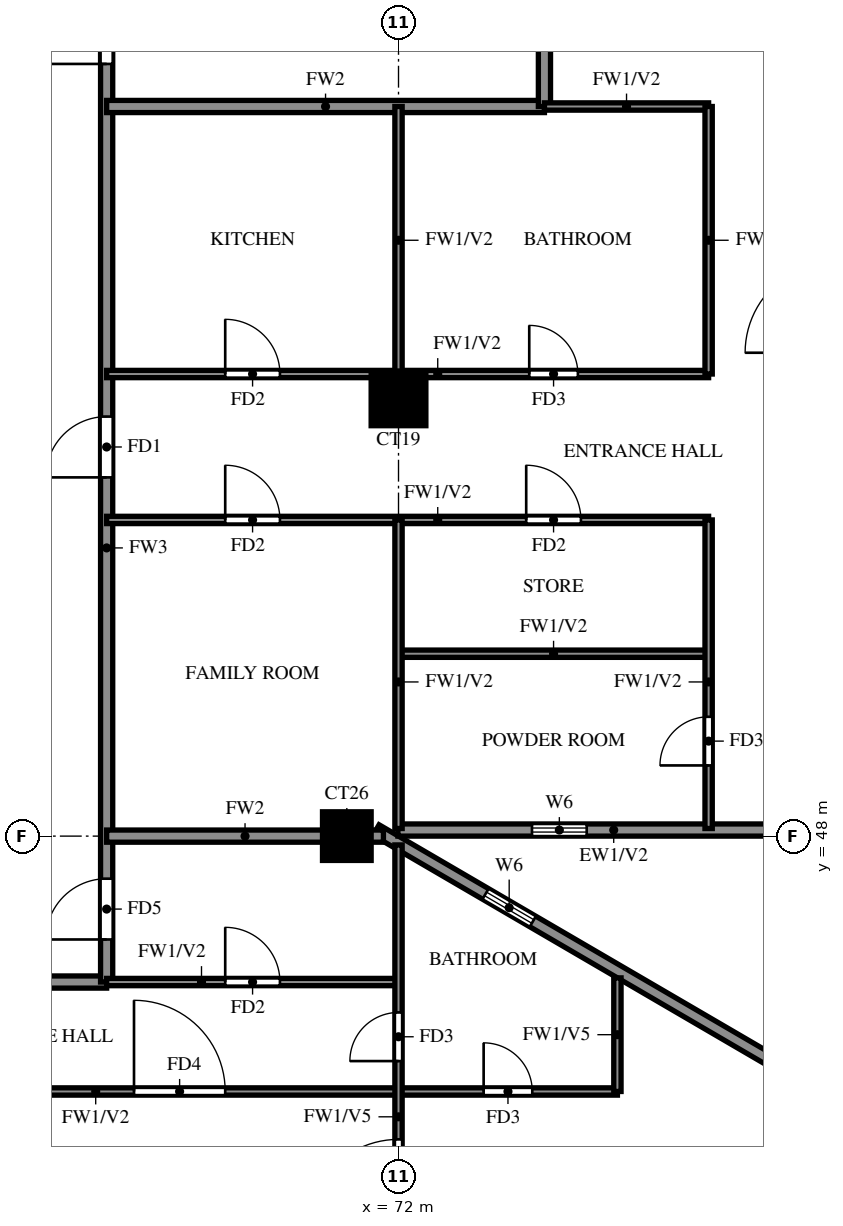
"""IFC4 building model, lengths in metres.
Left out: names, types, materials, properties, quantities, classifications, styles, units other than length and angle.
Written with IfcOpenShell. Run it as: python <this file> out.ifc"""

import sys

from ifc_helpers import new_model, si_unit, direction, frame, frame_2d, origin, origin_2d, place, context, subcontext, project, spatial, rectangle, extrude, source, transform, mapped, element, fill, save


model = new_model("IFC4")
c1 = context("Model", 3, precision=1e-05, world=origin(), true_north=direction((0.0, 1.0)))
c2 = subcontext(c1, "Body", "Model", "MODEL_VIEW")
j1 = project(units=[si_unit("LENGTHUNIT", "METRE"), si_unit("PLANEANGLEUNIT", "RADIAN")], contexts=[c1])
p1 = place(None, origin())
s1 = spatial("IfcSite", under=j1, at=p1, CompositionType="ELEMENT")
p2 = place(p1, origin())
s2 = spatial("IfcBuilding", under=s1, at=p2, CompositionType="ELEMENT")
p3 = place(p2, frame((0.0, 0.0, 188.5)))
s3 = spatial("IfcBuildingStorey", under=s2, at=p3, CompositionType="ELEMENT", Elevation=188.5)
m1 = source(origin(), c2, "Body", "SweptSolid", [
    extrude(rectangle(XDim=0.8, YDim=0.8, at=origin_2d()), origin(), (0.0, 0.0, 1.0), 3.2),
])
p4 = place(p3, frame((71.15, 48.0, 0.0), z_axis=(0.0, 0.0, 1.0), x_axis=(1.0, 0.0, 0.0)))
e1 = element("IfcColumn", 1, at=p4, inside=s3, PredefinedType="COLUMN", context=c2, shape_type="MappedRepresentation", body=[
    mapped(m1, transform((0.0, 0.0, 0.0))),
])
m2 = source(origin(), c2, "Body", "SweptSolid", [
    extrude(rectangle(XDim=0.9, YDim=0.9, at=origin_2d()), origin(), (0.0, 0.0, 1.0), 3.2),
])
p5 = place(p3, frame((72.0, 55.2, 0.0), z_axis=(0.0, 0.0, 1.0), x_axis=(1.0, 0.0, 0.0)))
e2 = element("IfcColumn", 2, at=p5, inside=s3, PredefinedType="COLUMN", context=c2, shape_type="MappedRepresentation", body=[
    mapped(m2, transform((0.0, 0.0, 0.0))),
])
p6 = place(p3, frame((85.719, 39.881, 0.0), z_axis=(0.0, 0.0, 1.0), x_axis=(-0.86377618652, 0.503875678716, 0.0)))
e3 = element("IfcWall", 3, at=p6, inside=s3, PredefinedType="SOLIDWALL", context=c2, shape_type="SweptSolid", body=[
    extrude(rectangle(XDim=16.311, YDim=0.2, at=frame_2d((8.156, 0.0))), origin(), (0.0, 0.0, 1.0), 3.2),
])
p7 = place(p6, frame((13.326, 0.0, 1.5)))
e4 = element("IfcOpeningElement", 4, at=p7, cuts=e3, PredefinedType="OPENING", context=c2, shape_type="SweptSolid", body=[
    extrude(rectangle(XDim=0.9, YDim=0.9, at=frame_2d((0.45, 0.45))), frame((0.0, 0.11, 0.0), z_axis=(0.0, -1.0, 0.0), x_axis=(1.0, 0.0, 0.0)), (0.0, 0.0, 1.0), 0.22),
])
p8 = place(p3, frame((71.99, 48.1, 0.0), z_axis=(0.0, 0.0, 1.0), x_axis=(1.0, 0.0, 0.0)))
e5 = element("IfcWall", 5, at=p8, inside=s3, PredefinedType="SOLIDWALL", context=c2, shape_type="SweptSolid", body=[
    extrude(rectangle(XDim=6.76, YDim=0.2, at=frame_2d((3.38, 0.0))), origin(), (0.0, 0.0, 1.0), 3.2),
])
p9 = place(p8, frame((2.205, 0.0, 1.5)))
e6 = element("IfcOpeningElement", 6, at=p9, cuts=e5, PredefinedType="OPENING", context=c2, shape_type="SweptSolid", body=[
    extrude(rectangle(XDim=0.9, YDim=0.9, at=frame_2d((0.45, 0.45))), frame((0.0, 0.11, 0.0), z_axis=(0.0, -1.0, 0.0), x_axis=(1.0, 0.0, 0.0)), (0.0, 0.0, 1.0), 0.22),
])
p10 = place(p3, frame((60.0, 45.6, 0.0), z_axis=(0.0, 0.0, 1.0), x_axis=(1.0, 0.0, 0.0)))
e7 = element("IfcWall", 7, at=p10, inside=s3, PredefinedType="SOLIDWALL", context=c2, shape_type="SweptSolid", body=[
    extrude(rectangle(XDim=7.2, YDim=0.2, at=frame_2d((3.6, 0.0))), origin(), (0.0, 0.0, 1.0), 3.2),
])
p11 = place(p3, frame((67.2, 45.6, 0.0), z_axis=(0.0, 0.0, 1.0), x_axis=(0.0, 1.0, 0.0)))
e8 = element("IfcWall", 8, at=p11, inside=s3, PredefinedType="SOLIDWALL", context=c2, shape_type="SweptSolid", body=[
    extrude(rectangle(XDim=16.8, YDim=0.2, at=frame_2d((8.4, 0.0))), origin(), (0.0, 0.0, 1.0), 3.2),
])
p12 = place(p11, frame((8.3, 0.0, 0.0)))
e9 = element("IfcOpeningElement", 9, at=p12, cuts=e8, PredefinedType="OPENING", context=c2, shape_type="SweptSolid", body=[
    extrude(rectangle(XDim=1.0, YDim=2.1, at=frame_2d((0.5, 1.05))), frame((0.0, 0.11, 0.0), z_axis=(0.0, -1.0, 0.0), x_axis=(1.0, 0.0, 0.0)), (0.0, 0.0, 1.0), 0.22),
])
p13 = place(p11, frame((15.1, 0.0, 0.0)))
e10 = element("IfcOpeningElement", 10, at=p13, cuts=e8, PredefinedType="OPENING", context=c2, shape_type="SweptSolid", body=[
    extrude(rectangle(XDim=1.0, YDim=2.1, at=frame_2d((0.5, 1.05))), frame((0.0, 0.11, 0.0), z_axis=(0.0, -1.0, 0.0), x_axis=(1.0, 0.0, 0.0)), (0.0, 0.0, 1.0), 0.22),
])
p14 = place(p11, frame((0.7, 0.0, 0.0)))
e11 = element("IfcOpeningElement", 11, at=p14, cuts=e8, PredefinedType="OPENING", context=c2, shape_type="SweptSolid", body=[
    extrude(rectangle(XDim=1.0, YDim=2.1, at=frame_2d((0.5, 1.05))), frame((0.0, 0.11, 0.0), z_axis=(0.0, -1.0, 0.0), x_axis=(1.0, 0.0, 0.0)), (0.0, 0.0, 1.0), 0.22),
])
p15 = place(p3, frame((67.2, 48.0, 0.0), z_axis=(0.0, 0.0, 1.0), x_axis=(1.0, 0.0, 0.0)))
e12 = element("IfcWall", 12, at=p15, inside=s3, PredefinedType="SOLIDWALL", context=c2, shape_type="SweptSolid", body=[
    extrude(rectangle(XDim=4.552, YDim=0.2, at=frame_2d((2.276, 0.0))), origin(), (0.0, 0.0, 1.0), 3.2),
])
p16 = place(p3, frame((67.2, 60.0, 0.0), z_axis=(0.0, 0.0, 1.0), x_axis=(1.0, 0.0, 0.0)))
e13 = element("IfcWall", 13, at=p16, inside=s3, PredefinedType="SOLIDWALL", context=c2, shape_type="SweptSolid", body=[
    extrude(rectangle(XDim=7.2, YDim=0.2, at=frame_2d((3.6, 0.0))), origin(), (0.0, 0.0, 1.0), 3.2),
])
p17 = place(p3, frame((74.4, 60.0, 0.0), z_axis=(0.0, 0.0, 1.0), x_axis=(0.0, 1.0, 0.0)))
e14 = element("IfcWall", 14, at=p17, inside=s3, PredefinedType="SOLIDWALL", context=c2, shape_type="SweptSolid", body=[
    extrude(rectangle(XDim=2.4, YDim=0.2, at=frame_2d((1.2, 0.0))), origin(), (0.0, 0.0, 1.0), 3.2),
])
p18 = place(p3, frame((60.0, 43.8, 0.0), z_axis=(0.0, 0.0, 1.0), x_axis=(1.0, 0.0, 0.0)))
e15 = element("IfcWall", 15, at=p18, inside=s3, PredefinedType="PARTITIONING", context=c2, shape_type="SweptSolid", body=[
    extrude(rectangle(XDim=15.6, YDim=0.12, at=frame_2d((7.8, 0.0))), origin(), (0.0, 0.0, 1.0), 3.2),
])
p19 = place(p18, frame((7.65, 0.0, 0.0)))
e16 = element("IfcOpeningElement", 16, at=p19, cuts=e15, PredefinedType="OPENING", context=c2, shape_type="SweptSolid", body=[
    extrude(rectangle(XDim=1.5, YDim=2.1, at=frame_2d((0.75, 1.05))), frame((0.0, 0.07, 0.0), z_axis=(0.0, -1.0, 0.0), x_axis=(1.0, 0.0, 0.0)), (0.0, 0.0, 1.0), 0.14),
])
p20 = place(p18, frame((1.95, 0.0, 0.0)))
e17 = element("IfcOpeningElement", 17, at=p20, cuts=e15, PredefinedType="OPENING", context=c2, shape_type="SweptSolid", body=[
    extrude(rectangle(XDim=0.9, YDim=2.1, at=frame_2d((0.45, 1.05))), frame((0.0, 0.07, 0.0), z_axis=(0.0, -1.0, 0.0), x_axis=(1.0, 0.0, 0.0)), (0.0, 0.0, 1.0), 0.14),
])
p21 = place(p18, frame((13.4, 0.0, 0.0)))
e18 = element("IfcOpeningElement", 18, at=p21, cuts=e15, PredefinedType="OPENING", context=c2, shape_type="SweptSolid", body=[
    extrude(rectangle(XDim=0.8, YDim=2.1, at=frame_2d((0.4, 1.05))), frame((0.0, 0.07, 0.0), z_axis=(0.0, -1.0, 0.0), x_axis=(1.0, 0.0, 0.0)), (0.0, 0.0, 1.0), 0.14),
])
p22 = place(p3, frame((67.2, 45.6, 0.0), z_axis=(0.0, 0.0, 1.0), x_axis=(1.0, 0.0, 0.0)))
e19 = element("IfcWall", 19, at=p22, inside=s3, PredefinedType="PARTITIONING", context=c2, shape_type="SweptSolid", body=[
    extrude(rectangle(XDim=4.8, YDim=0.12, at=frame_2d((2.4, 0.0))), origin(), (0.0, 0.0, 1.0), 3.2),
])
p23 = place(p22, frame((1.95, 0.0, 0.0)))
e20 = element("IfcOpeningElement", 20, at=p23, cuts=e19, PredefinedType="OPENING", context=c2, shape_type="SweptSolid", body=[
    extrude(rectangle(XDim=0.9, YDim=2.1, at=frame_2d((0.45, 1.05))), frame((0.0, 0.07, 0.0), z_axis=(0.0, -1.0, 0.0), x_axis=(1.0, 0.0, 0.0)), (0.0, 0.0, 1.0), 0.14),
])
p24 = place(p3, frame((72.0, 51.0, 0.0), z_axis=(0.0, 0.0, 1.0), x_axis=(1.0, 0.0, 0.0)))
e21 = element("IfcWall", 21, at=p24, inside=s3, PredefinedType="PARTITIONING", context=c2, shape_type="SweptSolid", body=[
    extrude(rectangle(XDim=5.1, YDim=0.12, at=frame_2d((2.55, 0.0))), origin(), (0.0, 0.0, 1.0), 3.2),
])
p25 = place(p3, frame((67.2, 53.2, 0.0), z_axis=(0.0, 0.0, 1.0), x_axis=(1.0, 0.0, 0.0)))
e22 = element("IfcWall", 22, at=p25, inside=s3, PredefinedType="PARTITIONING", context=c2, shape_type="SweptSolid", body=[
    extrude(rectangle(XDim=9.9, YDim=0.12, at=frame_2d((4.95, 0.0))), origin(), (0.0, 0.0, 1.0), 3.2),
])
p26 = place(p25, frame((6.9, 0.0, 0.0)))
e23 = element("IfcOpeningElement", 23, at=p26, cuts=e22, PredefinedType="OPENING", context=c2, shape_type="SweptSolid", body=[
    extrude(rectangle(XDim=0.9, YDim=2.1, at=frame_2d((0.45, 1.05))), frame((0.0, 0.07, 0.0), z_axis=(0.0, -1.0, 0.0), x_axis=(1.0, 0.0, 0.0)), (0.0, 0.0, 1.0), 0.14),
])
p27 = place(p25, frame((1.95, 0.0, 0.0)))
e24 = element("IfcOpeningElement", 24, at=p27, cuts=e22, PredefinedType="OPENING", context=c2, shape_type="SweptSolid", body=[
    extrude(rectangle(XDim=0.9, YDim=2.1, at=frame_2d((0.45, 1.05))), frame((0.0, 0.07, 0.0), z_axis=(0.0, -1.0, 0.0), x_axis=(1.0, 0.0, 0.0)), (0.0, 0.0, 1.0), 0.14),
])
p28 = place(p3, frame((67.2, 55.6, 0.0), z_axis=(0.0, 0.0, 1.0), x_axis=(1.0, 0.0, 0.0)))
e25 = element("IfcWall", 25, at=p28, inside=s3, PredefinedType="PARTITIONING", context=c2, shape_type="SweptSolid", body=[
    extrude(rectangle(XDim=9.9, YDim=0.12, at=frame_2d((4.95, 0.0))), origin(), (0.0, 0.0, 1.0), 3.2),
])
p29 = place(p28, frame((6.95, 0.0, 0.0)))
e26 = element("IfcOpeningElement", 26, at=p29, cuts=e25, PredefinedType="OPENING", context=c2, shape_type="SweptSolid", body=[
    extrude(rectangle(XDim=0.8, YDim=2.1, at=frame_2d((0.4, 1.05))), frame((0.0, 0.07, 0.0), z_axis=(0.0, -1.0, 0.0), x_axis=(1.0, 0.0, 0.0)), (0.0, 0.0, 1.0), 0.14),
])
p30 = place(p28, frame((1.95, 0.0, 0.0)))
e27 = element("IfcOpeningElement", 27, at=p30, cuts=e25, PredefinedType="OPENING", context=c2, shape_type="SweptSolid", body=[
    extrude(rectangle(XDim=0.9, YDim=2.1, at=frame_2d((0.45, 1.05))), frame((0.0, 0.07, 0.0), z_axis=(0.0, -1.0, 0.0), x_axis=(1.0, 0.0, 0.0)), (0.0, 0.0, 1.0), 0.14),
])
p31 = place(p3, frame((74.4, 60.0, 0.0), z_axis=(0.0, 0.0, 1.0), x_axis=(1.0, 0.0, 0.0)))
e28 = element("IfcWall", 28, at=p31, inside=s3, PredefinedType="PARTITIONING", context=c2, shape_type="SweptSolid", body=[
    extrude(rectangle(XDim=2.7, YDim=0.12, at=frame_2d((1.35, 0.0))), origin(), (0.0, 0.0, 1.0), 3.2),
])
p32 = place(p3, frame((72.0, 39.725, 0.0), z_axis=(0.0, 0.0, 1.0), x_axis=(0.0, 1.0, 0.0)))
e29 = element("IfcWall", 29, at=p32, inside=s3, PredefinedType="PARTITIONING", context=c2, shape_type="SweptSolid", body=[
    extrude(rectangle(XDim=8.13, YDim=0.12, at=frame_2d((4.065, 0.0))), origin(), (0.0, 0.0, 1.0), 2.3),
])
p33 = place(p32, frame((1.788, 0.0, 0.0)))
e30 = element("IfcOpeningElement", 30, at=p33, cuts=e29, PredefinedType="OPENING", context=c2, shape_type="SweptSolid", body=[
    extrude(rectangle(XDim=1.5, YDim=2.1, at=frame_2d((0.75, 1.05))), frame((0.0, 0.07, 0.0), z_axis=(0.0, -1.0, 0.0), x_axis=(1.0, 0.0, 0.0)), (0.0, 0.0, 1.0), 0.14),
])
p34 = place(p32, frame((4.575, 0.0, 0.0)))
e31 = element("IfcOpeningElement", 31, at=p34, cuts=e29, PredefinedType="OPENING", context=c2, shape_type="SweptSolid", body=[
    extrude(rectangle(XDim=0.8, YDim=2.1, at=frame_2d((0.4, 1.05))), frame((0.0, 0.07, 0.0), z_axis=(0.0, -1.0, 0.0), x_axis=(1.0, 0.0, 0.0)), (0.0, 0.0, 1.0), 0.14),
])
p35 = place(p3, frame((72.0, 48.125, 0.0), z_axis=(0.0, 0.0, 1.0), x_axis=(0.0, 1.0, 0.0)))
e32 = element("IfcWall", 32, at=p35, inside=s3, PredefinedType="PARTITIONING", context=c2, shape_type="SweptSolid", body=[
    extrude(rectangle(XDim=5.075, YDim=0.12, at=frame_2d((2.538, 0.0))), origin(), (0.0, 0.0, 1.0), 3.2),
])
p36 = place(p3, frame((72.0, 55.6, 0.0), z_axis=(0.0, 0.0, 1.0), x_axis=(0.0, 1.0, 0.0)))
e33 = element("IfcWall", 33, at=p36, inside=s3, PredefinedType="PARTITIONING", context=c2, shape_type="SweptSolid", body=[
    extrude(rectangle(XDim=4.4, YDim=0.12, at=frame_2d((2.2, 0.0))), origin(), (0.0, 0.0, 1.0), 3.2),
])
p37 = place(p3, frame((75.6, 43.8, 0.0), z_axis=(0.0, 0.0, 1.0), x_axis=(0.0, 1.0, 0.0)))
e34 = element("IfcWall", 34, at=p37, inside=s3, PredefinedType="PARTITIONING", context=c2, shape_type="SweptSolid", body=[
    extrude(rectangle(XDim=1.868, YDim=0.12, at=frame_2d((0.934, 0.0))), origin(), (0.0, 0.0, 1.0), 2.3),
])
p38 = place(p3, frame((77.1, 48.125, 0.0), z_axis=(0.0, 0.0, 1.0), x_axis=(0.0, 1.0, 0.0)))
e35 = element("IfcWall", 35, at=p38, inside=s3, PredefinedType="PARTITIONING", context=c2, shape_type="SweptSolid", body=[
    extrude(rectangle(XDim=5.075, YDim=0.12, at=frame_2d((2.538, 0.0))), origin(), (0.0, 0.0, 1.0), 3.2),
])
p39 = place(p38, frame((1.038, 0.0, 0.0)))
e36 = element("IfcOpeningElement", 36, at=p39, cuts=e35, PredefinedType="OPENING", context=c2, shape_type="SweptSolid", body=[
    extrude(rectangle(XDim=0.8, YDim=2.1, at=frame_2d((0.4, 1.05))), frame((0.0, 0.07, 0.0), z_axis=(0.0, -1.0, 0.0), x_axis=(1.0, 0.0, 0.0)), (0.0, 0.0, 1.0), 0.14),
])
p40 = place(p3, frame((77.1, 55.6, 0.0), z_axis=(0.0, 0.0, 1.0), x_axis=(0.0, 1.0, 0.0)))
e37 = element("IfcWall", 37, at=p40, inside=s3, PredefinedType="PARTITIONING", context=c2, shape_type="SweptSolid", body=[
    extrude(rectangle(XDim=4.4, YDim=0.12, at=frame_2d((2.2, 0.0))), origin(), (0.0, 0.0, 1.0), 3.2),
])
p41 = place(p7, origin())
e38 = element("IfcWindow", 38, at=p41, inside=s3, PartitioningType="SINGLE_PANEL", PredefinedType="WINDOW", context=c2, shape_type="SweptSolid", body=[
    extrude(rectangle(XDim=0.9, YDim=0.9, at=frame_2d((0.45, 0.45))), frame((0.0, 0.03, 0.0), z_axis=(0.0, -1.0, 0.0), x_axis=(1.0, 0.0, 0.0)), (0.0, 0.0, 1.0), 0.06),
])
fill(e4, e38)
p42 = place(p9, origin())
e39 = element("IfcWindow", 39, at=p42, inside=s3, PartitioningType="SINGLE_PANEL", PredefinedType="WINDOW", context=c2, shape_type="SweptSolid", body=[
    extrude(rectangle(XDim=0.9, YDim=0.9, at=frame_2d((0.45, 0.45))), frame((0.0, 0.03, 0.0), z_axis=(0.0, -1.0, 0.0), x_axis=(1.0, 0.0, 0.0)), (0.0, 0.0, 1.0), 0.06),
])
fill(e6, e39)
p43 = place(p12, origin())
e40 = element("IfcDoor", 40, at=p43, inside=s3, OperationType="SINGLE_SWING_LEFT", PredefinedType="DOOR", context=c2, shape_type="SweptSolid", body=[
    extrude(rectangle(XDim=1.0, YDim=2.1, at=frame_2d((0.5, 1.05))), frame((0.0, 0.025, 0.0), z_axis=(0.0, -1.0, 0.0), x_axis=(1.0, 0.0, 0.0)), (0.0, 0.0, 1.0), 0.05),
])
fill(e9, e40)
p44 = place(p39, origin())
e41 = element("IfcDoor", 41, at=p44, inside=s3, OperationType="SINGLE_SWING_LEFT", PredefinedType="DOOR", context=c2, shape_type="SweptSolid", body=[
    extrude(rectangle(XDim=0.8, YDim=2.1, at=frame_2d((0.4, 1.05))), frame((0.0, 0.025, 0.0), z_axis=(0.0, -1.0, 0.0), x_axis=(1.0, 0.0, 0.0)), (0.0, 0.0, 1.0), 0.05),
])
fill(e36, e41)
p45 = place(p26, origin())
e42 = element("IfcDoor", 42, at=p45, inside=s3, OperationType="SINGLE_SWING_RIGHT", PredefinedType="DOOR", context=c2, shape_type="SweptSolid", body=[
    extrude(rectangle(XDim=0.9, YDim=2.1, at=frame_2d((0.45, 1.05))), frame((0.0, 0.025, 0.0), z_axis=(0.0, -1.0, 0.0), x_axis=(1.0, 0.0, 0.0)), (0.0, 0.0, 1.0), 0.05),
])
fill(e23, e42)
p46 = place(p29, origin())
e43 = element("IfcDoor", 43, at=p46, inside=s3, OperationType="SINGLE_SWING_LEFT", PredefinedType="DOOR", context=c2, shape_type="SweptSolid", body=[
    extrude(rectangle(XDim=0.8, YDim=2.1, at=frame_2d((0.4, 1.05))), frame((0.0, 0.025, 0.0), z_axis=(0.0, -1.0, 0.0), x_axis=(1.0, 0.0, 0.0)), (0.0, 0.0, 1.0), 0.05),
])
fill(e26, e43)
p47 = place(p27, origin())
e44 = element("IfcDoor", 44, at=p47, inside=s3, OperationType="SINGLE_SWING_LEFT", PredefinedType="DOOR", context=c2, shape_type="SweptSolid", body=[
    extrude(rectangle(XDim=0.9, YDim=2.1, at=frame_2d((0.45, 1.05))), frame((0.0, 0.025, 0.0), z_axis=(0.0, -1.0, 0.0), x_axis=(1.0, 0.0, 0.0)), (0.0, 0.0, 1.0), 0.05),
])
fill(e24, e44)
p48 = place(p30, origin())
e45 = element("IfcDoor", 45, at=p48, inside=s3, OperationType="SINGLE_SWING_RIGHT", PredefinedType="DOOR", context=c2, shape_type="SweptSolid", body=[
    extrude(rectangle(XDim=0.9, YDim=2.1, at=frame_2d((0.45, 1.05))), frame((0.0, 0.025, 0.0), z_axis=(0.0, -1.0, 0.0), x_axis=(1.0, 0.0, 0.0)), (0.0, 0.0, 1.0), 0.05),
])
fill(e27, e45)
p49 = place(p13, origin())
e46 = element("IfcDoor", 46, at=p49, inside=s3, OperationType="SINGLE_SWING_RIGHT", PredefinedType="DOOR", context=c2, shape_type="SweptSolid", body=[
    extrude(rectangle(XDim=1.0, YDim=2.1, at=frame_2d((0.5, 1.05))), frame((0.0, 0.025, 0.0), z_axis=(0.0, -1.0, 0.0), x_axis=(1.0, 0.0, 0.0)), (0.0, 0.0, 1.0), 0.05),
])
fill(e10, e46)
p50 = place(p23, origin())
e47 = element("IfcDoor", 47, at=p50, inside=s3, OperationType="SINGLE_SWING_LEFT", PredefinedType="DOOR", context=c2, shape_type="SweptSolid", body=[
    extrude(rectangle(XDim=0.9, YDim=2.1, at=frame_2d((0.45, 1.05))), frame((0.0, 0.025, 0.0), z_axis=(0.0, -1.0, 0.0), x_axis=(1.0, 0.0, 0.0)), (0.0, 0.0, 1.0), 0.05),
])
fill(e20, e47)
p51 = place(p14, origin())
e48 = element("IfcDoor", 48, at=p51, inside=s3, OperationType="SINGLE_SWING_RIGHT", PredefinedType="DOOR", context=c2, shape_type="SweptSolid", body=[
    extrude(rectangle(XDim=1.0, YDim=2.1, at=frame_2d((0.5, 1.05))), frame((0.0, 0.025, 0.0), z_axis=(0.0, -1.0, 0.0), x_axis=(1.0, 0.0, 0.0)), (0.0, 0.0, 1.0), 0.05),
])
fill(e11, e48)
p52 = place(p19, origin())
e49 = element("IfcDoor", 49, at=p52, inside=s3, OperationType="SINGLE_SWING_LEFT", PredefinedType="DOOR", context=c2, shape_type="SweptSolid", body=[
    extrude(rectangle(XDim=1.5, YDim=2.1, at=frame_2d((0.75, 1.05))), frame((0.0, 0.025, 0.0), z_axis=(0.0, -1.0, 0.0), x_axis=(1.0, 0.0, 0.0)), (0.0, 0.0, 1.0), 0.05),
])
fill(e16, e49)
p53 = place(p33, origin())
e50 = element("IfcDoor", 50, at=p53, inside=s3, OperationType="SINGLE_SWING_LEFT", PredefinedType="DOOR", context=c2, shape_type="SweptSolid", body=[
    extrude(rectangle(XDim=1.5, YDim=2.1, at=frame_2d((0.75, 1.05))), frame((0.0, 0.025, 0.0), z_axis=(0.0, -1.0, 0.0), x_axis=(1.0, 0.0, 0.0)), (0.0, 0.0, 1.0), 0.05),
])
fill(e30, e50)
p54 = place(p34, origin())
e51 = element("IfcDoor", 51, at=p54, inside=s3, OperationType="SINGLE_SWING_LEFT", PredefinedType="DOOR", context=c2, shape_type="SweptSolid", body=[
    extrude(rectangle(XDim=0.8, YDim=2.1, at=frame_2d((0.4, 1.05))), frame((0.0, 0.025, 0.0), z_axis=(0.0, -1.0, 0.0), x_axis=(1.0, 0.0, 0.0)), (0.0, 0.0, 1.0), 0.05),
])
fill(e31, e51)
p55 = place(p21, origin())
e52 = element("IfcDoor", 52, at=p55, inside=s3, OperationType="SINGLE_SWING_LEFT", PredefinedType="DOOR", context=c2, shape_type="SweptSolid", body=[
    extrude(rectangle(XDim=0.8, YDim=2.1, at=frame_2d((0.4, 1.05))), frame((0.0, 0.025, 0.0), z_axis=(0.0, -1.0, 0.0), x_axis=(1.0, 0.0, 0.0)), (0.0, 0.0, 1.0), 0.05),
])
fill(e18, e52)
save(model, sys.argv[1])
